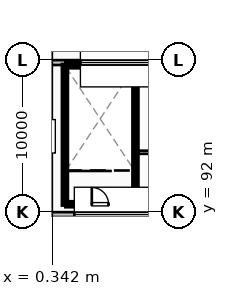
"""IFC4 building model, lengths in metres.
Left out: names, types, materials, properties, quantities, classifications, styles, units other than length and angle.
Written with IfcOpenShell. Run it as: python <this file> out.ifc"""

import sys

from ifc_helpers import new_model, si_unit, direction, frame, frame_2d, origin, place, context, subcontext, project, spatial, rectangle, extrude, element, fill, save


model = new_model("IFC4")
c1 = context("Model", 3, precision=1e-05, world=origin(), true_north=direction((0.0, 1.0)))
c2 = subcontext(c1, "Body", "Model", "MODEL_VIEW")
j1 = project(units=[si_unit("LENGTHUNIT", "METRE"), si_unit("PLANEANGLEUNIT", "RADIAN")], contexts=[c1])
p1 = place(None, origin())
s1 = spatial("IfcSite", under=j1, at=p1, CompositionType="ELEMENT")
p2 = place(p1, origin())
s2 = spatial("IfcBuilding", under=s1, at=p2, CompositionType="ELEMENT")
p3 = place(p2, frame((0.0, 0.0, 28.8)))
s3 = spatial("IfcBuildingStorey", under=s2, at=p3, CompositionType="ELEMENT", Elevation=28.8)
p4 = place(p3, frame((0.16, 91.85, 5.4), z_axis=(0.0, 0.0, 1.0), x_axis=(1.0, 0.0, 0.0)))
e1 = element("IfcWall", 1, at=p4, inside=s3, PredefinedType="STANDARD", context=c2, shape_type="SweptSolid", body=[
    extrude(rectangle(XDim=10.48, YDim=0.32, at=frame_2d((5.24, 0.0))), origin(), (0.0, 0.0, 1.0), 2.45),
])
p5 = place(p4, frame((1.64, 0.0, 0.45)))
e2 = element("IfcOpeningElement", 2, at=p5, cuts=e1, PredefinedType="OPENING", context=c2, shape_type="SweptSolid", body=[
    extrude(rectangle(XDim=7.2, YDim=1.5, at=frame_2d((3.6, 0.75))), frame((0.0, 0.17, 0.0), z_axis=(0.0, -1.0, 0.0), x_axis=(1.0, 0.0, 0.0)), (0.0, 0.0, 1.0), 0.34),
])
p6 = place(p3, frame((0.16, 101.85, 5.4), z_axis=(0.0, 0.0, 1.0), x_axis=(1.0, 0.0, 0.0)))
e3 = element("IfcWall", 3, at=p6, inside=s3, PredefinedType="STANDARD", context=c2, shape_type="SweptSolid", body=[
    extrude(rectangle(XDim=10.48, YDim=0.32, at=frame_2d((5.24, 0.0))), origin(), (0.0, 0.0, 1.0), 2.45),
])
p7 = place(p6, frame((2.04, 0.0, 0.45)))
e4 = element("IfcOpeningElement", 4, at=p7, cuts=e3, PredefinedType="OPENING", context=c2, shape_type="SweptSolid", body=[
    extrude(rectangle(XDim=6.4, YDim=1.5, at=frame_2d((3.2, 0.75))), frame((0.0, 0.17, 0.0), z_axis=(0.0, -1.0, 0.0), x_axis=(1.0, 0.0, 0.0)), (0.0, 0.0, 1.0), 0.34),
])
for number, where, z_axis, x_axis in (
    (5, (1.18, 92.53, 0.0), (0.0, 0.0, 1.0), (0.0, 1.0, 0.0)),
    (6, (5.82, 92.53, 0.0), (0.0, 0.0, 1.0), (0.0, 1.0, 0.0)),
):
    element("IfcWall", number, at=place(p3, frame(where, z_axis=z_axis, x_axis=x_axis)), inside=s3, PredefinedType="SHEAR", context=c2, shape_type="SweptSolid", body=[
        extrude(rectangle(XDim=9.14, YDim=0.22, at=frame_2d((4.57, 0.0))), origin(), (0.0, 0.0, 1.0), 5.16),
    ])
p8 = place(p3, frame((1.3, 101.67, 0.0), z_axis=(0.0, 0.0, 1.0), x_axis=(1.0, 0.0, 0.0)))
e7 = element("IfcWall", 7, at=p8, inside=s3, PredefinedType="SHEAR", context=c2, shape_type="SweptSolid", body=[
    extrude(rectangle(XDim=4.4, YDim=0.22, at=frame_2d((2.2, 0.0))), origin(), (0.0, 0.0, 1.0), 5.16),
])
p9 = place(p3, frame((1.3, 92.53, 0.0), z_axis=(0.0, 0.0, 1.0), x_axis=(1.0, 0.0, 0.0)))
e8 = element("IfcWall", 8, at=p9, inside=s3, PredefinedType="SHEAR", context=c2, shape_type="SweptSolid", body=[
    extrude(rectangle(XDim=4.4, YDim=0.22, at=frame_2d((2.2, 0.0))), origin(), (0.0, 0.0, 1.0), 5.16),
])
p10 = place(p9, frame((1.65, 0.0, 0.0)))
e9 = element("IfcOpeningElement", 9, at=p10, cuts=e8, PredefinedType="OPENING", context=c2, shape_type="SweptSolid", body=[
    extrude(rectangle(XDim=1.1, YDim=2.2, at=frame_2d((0.55, 1.1))), frame((0.0, 0.12, 0.0), z_axis=(0.0, -1.0, 0.0), x_axis=(1.0, 0.0, 0.0)), (0.0, 0.0, 1.0), 0.24),
])
p11 = place(p3, frame((6.0, 91.975, 0.0), z_axis=(0.0, 0.0, 1.0), x_axis=(1.0, 0.0, 0.0)))
e10 = element("IfcWall", 10, at=p11, inside=s3, PredefinedType="PARTITIONING", context=c2, shape_type="SweptSolid", body=[
    extrude(rectangle(XDim=4.62, YDim=0.11, at=frame_2d((2.31, 0.0))), origin(), (0.0, 0.0, 1.0), 5.044),
])
p12 = place(p11, frame((1.11, 0.0, 0.0)))
e11 = element("IfcOpeningElement", 11, at=p12, cuts=e10, PredefinedType="OPENING", context=c2, shape_type="SweptSolid", body=[
    extrude(rectangle(XDim=2.4, YDim=2.8, at=frame_2d((1.2, 1.4))), frame((0.0, 0.065, 0.0), z_axis=(0.0, -1.0, 0.0), x_axis=(1.0, 0.0, 0.0)), (0.0, 0.0, 1.0), 0.13),
])
p13 = place(p3, frame((6.0, 95.95, 0.0), z_axis=(0.0, 0.0, 1.0), x_axis=(1.0, 0.0, 0.0)))
e12 = element("IfcWall", 12, at=p13, inside=s3, PredefinedType="PARTITIONING", context=c2, shape_type="SweptSolid", body=[
    extrude(rectangle(XDim=15.42, YDim=0.21, at=frame_2d((7.71, 0.0))), origin(), (0.0, 0.0, 1.0), 5.12),
])
p14 = place(p13, frame((6.51, 0.0, 0.0)))
e13 = element("IfcOpeningElement", 13, at=p14, cuts=e12, PredefinedType="OPENING", context=c2, shape_type="SweptSolid", body=[
    extrude(rectangle(XDim=2.4, YDim=2.8, at=frame_2d((1.2, 1.4))), frame((0.0, 0.115, 0.0), z_axis=(0.0, -1.0, 0.0), x_axis=(1.0, 0.0, 0.0)), (0.0, 0.0, 1.0), 0.23),
])
p15 = place(p5, origin())
e14 = element("IfcWindow", 14, at=p15, inside=s3, PartitioningType="SINGLE_PANEL", PredefinedType="SKYLIGHT", context=c2, shape_type="SweptSolid", body=[
    extrude(rectangle(XDim=7.2, YDim=1.5, at=frame_2d((3.6, 0.75))), frame((0.0, 0.03, 0.0), z_axis=(0.0, -1.0, 0.0), x_axis=(1.0, 0.0, 0.0)), (0.0, 0.0, 1.0), 0.06),
])
fill(e2, e14)
p16 = place(p7, origin())
e15 = element("IfcWindow", 15, at=p16, inside=s3, PartitioningType="SINGLE_PANEL", PredefinedType="SKYLIGHT", context=c2, shape_type="SweptSolid", body=[
    extrude(rectangle(XDim=6.4, YDim=1.5, at=frame_2d((3.2, 0.75))), frame((0.0, 0.03, 0.0), z_axis=(0.0, -1.0, 0.0), x_axis=(1.0, 0.0, 0.0)), (0.0, 0.0, 1.0), 0.06),
])
fill(e4, e15)
p17 = place(p10, origin())
e16 = element("IfcDoor", 16, at=p17, inside=s3, OperationType="SINGLE_SWING_LEFT", PredefinedType="DOOR", context=c2, shape_type="SweptSolid", body=[
    extrude(rectangle(XDim=1.1, YDim=2.2, at=frame_2d((0.55, 1.1))), frame((0.0, 0.025, 0.0), z_axis=(0.0, -1.0, 0.0), x_axis=(1.0, 0.0, 0.0)), (0.0, 0.0, 1.0), 0.05),
])
fill(e9, e16)
save(model, sys.argv[1])
